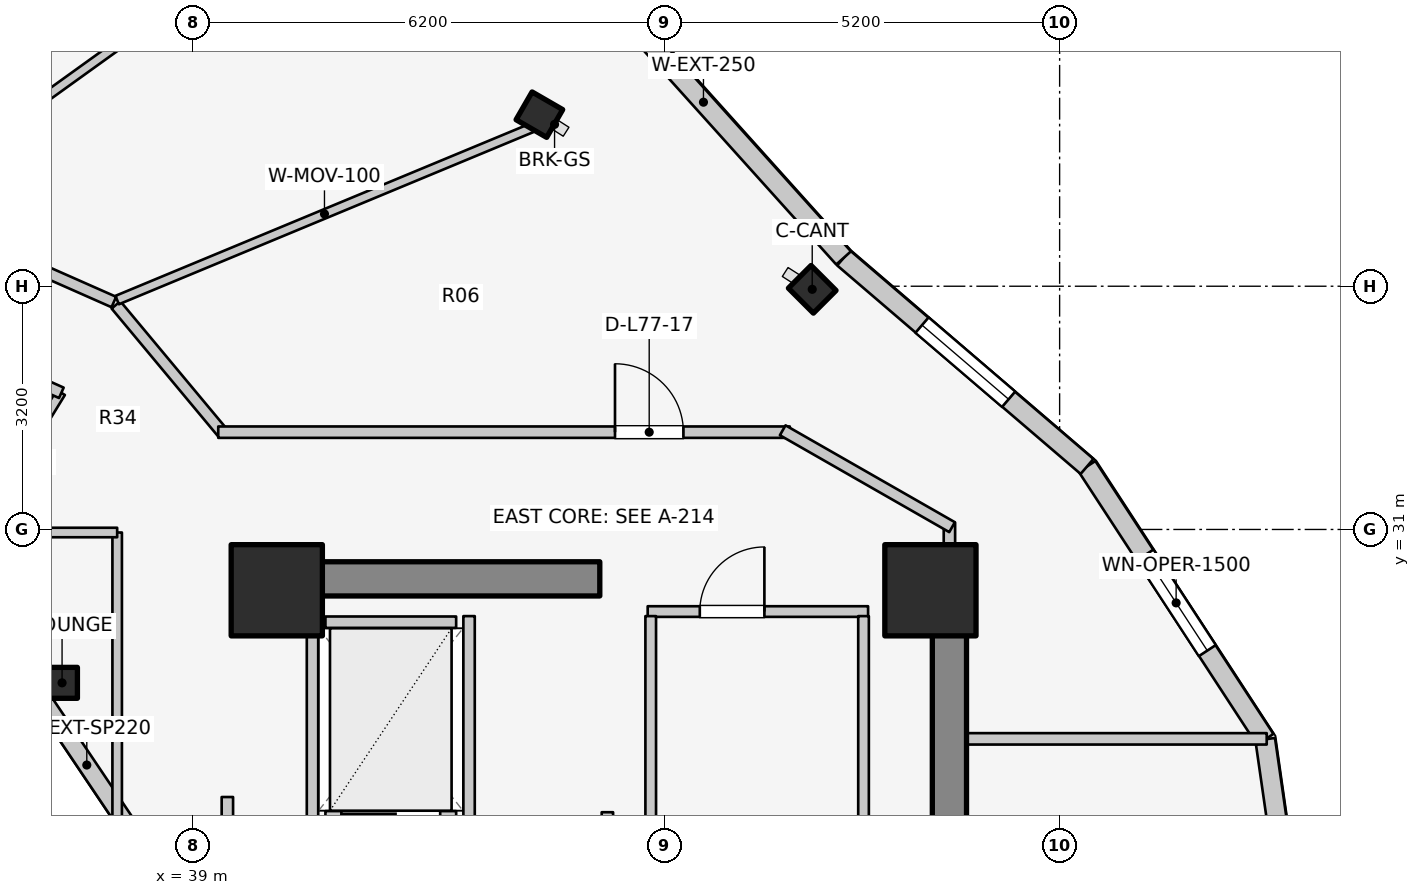
"""IFC4 building model, lengths in metres.
Left out: names, types, materials, properties, quantities, classifications, styles, units other than length and angle.
Written with IfcOpenShell. Run it as: python <this file> out.ifc"""

import sys

from ifc_helpers import new_model, si_unit, direction, frame, frame_2d, origin, origin_2d, place, context, subcontext, project, spatial, rectangle, i_section, extrude, element, fill, save


model = new_model("IFC4")
c1 = context("Model", 3, precision=1e-05, world=origin(), true_north=direction((0.0, 1.0)))
c2 = subcontext(c1, "Body", "Model", "MODEL_VIEW")
j1 = project(units=[si_unit("LENGTHUNIT", "METRE"), si_unit("PLANEANGLEUNIT", "RADIAN")], contexts=[c1])
p1 = place(None, origin())
s1 = spatial("IfcSite", under=j1, at=p1, CompositionType="ELEMENT")
p2 = place(p1, origin())
s2 = spatial("IfcBuilding", under=s1, at=p2, CompositionType="ELEMENT")
p3 = place(p2, frame((0.0, 0.0, 253.2)))
s3 = spatial("IfcBuildingStorey", under=s2, at=p3, CompositionType="ELEMENT", Elevation=253.2)
p4 = place(p3, frame((48.95, 17.05, 0.0), z_axis=(0.0, 0.0, 1.0), x_axis=(0.0, 1.0, 0.0)))
e1 = element("IfcWall", 1, at=p4, inside=s3, PredefinedType="SHEAR", context=c2, shape_type="SweptSolid", body=[
    extrude(rectangle(XDim=12.8, YDim=0.45, at=frame_2d((6.4, 0.0))), origin(), (0.0, 0.0, 1.0), 3.6),
])
p5 = place(p3, frame((39.85, 30.35, 0.0), z_axis=(0.0, 0.0, 1.0), x_axis=(1.0, 0.0, 0.0)))
e2 = element("IfcWall", 2, at=p5, inside=s3, PredefinedType="SHEAR", context=c2, shape_type="SweptSolid", body=[
    extrude(rectangle(XDim=4.5, YDim=0.45, at=frame_2d((2.25, 0.0))), origin(), (0.0, 0.0, 1.0), 3.6),
])
for number, where, z_axis, x_axis in (
    (3, (48.7, 30.2, 0.0), (0.0, 0.0, 1.0), (1.0, 0.0, 0.0)),
    (4, (40.1, 30.2, 0.0), (0.0, 0.0, 1.0), (1.0, 0.0, 0.0)),
):
    element("IfcColumn", number, at=place(p3, frame(where, z_axis=z_axis, x_axis=x_axis)), inside=s3, PredefinedType="COLUMN", context=c2, shape_type="SweptSolid", body=[
        extrude(rectangle(XDim=1.2, YDim=1.2, at=origin_2d()), origin(), (0.0, 0.0, 1.0), 3.6),
    ])
p6 = place(p3, frame((37.275, 28.982, 0.0), z_axis=(0.0, 0.0, 1.0), x_axis=(1.0, 0.0, 0.0)))
e5 = element("IfcColumn", 5, at=p6, inside=s3, PredefinedType="COLUMN", context=c2, shape_type="SweptSolid", body=[
    extrude(i_section(OverallWidth=0.404, OverallDepth=0.407, WebThickness=0.027, FlangeThickness=0.044, FilletRadius=0.025, at=origin_2d()), origin(), (0.0, 0.0, 1.0), 3.6),
])
for number, where, z_axis, x_axis in (
    (6, (47.145, 34.159, 0.0), (0.0, 0.0, 1.0), (0.707, 0.707, 0.0)),
    (7, (43.555, 36.457, 0.0), (0.0, 0.0, 1.0), (0.5, 0.866, 0.0)),
):
    element("IfcColumn", number, at=place(p3, frame(where, z_axis=z_axis, x_axis=x_axis)), inside=s3, PredefinedType="COLUMN", context=c2, shape_type="SweptSolid", body=[
        extrude(i_section(OverallWidth=0.422, OverallDepth=0.465, WebThickness=0.045, FlangeThickness=0.073, FilletRadius=0.025, at=origin_2d()), origin(), (0.0, 0.0, 1.0), 3.6),
    ])
p7 = place(p3, frame((38.166, 27.06, 0.0), z_axis=(0.0, 0.0, 1.0), x_axis=(-0.558197800898, 0.829707909492, 0.0)))
e8 = element("IfcWall", 8, at=p7, inside=s3, PredefinedType="STANDARD", context=c2, shape_type="SweptSolid", body=[
    extrude(rectangle(XDim=2.027, YDim=0.23, at=frame_2d((1.013, 0.0))), origin(), (0.0, 0.0, 1.0), 2.6),
])
p8 = place(p3, frame((53.86, 23.0, 0.0), z_axis=(0.0, 0.0, 1.0), x_axis=(-0.142712754019, 0.989764148593, 0.0)))
e9 = element("IfcWall", 9, at=p8, inside=s3, PredefinedType="STANDARD", context=c2, shape_type="SweptSolid", body=[
    extrude(rectangle(XDim=5.293, YDim=0.26, at=frame_2d((2.646, 0.0))), origin(), (0.0, 0.0, 1.0), 3.29),
])
p9 = place(p8, frame((2.678, 0.0, 0.75)))
e10 = element("IfcOpeningElement", 10, at=p9, cuts=e9, PredefinedType="OPENING", context=c2, shape_type="SweptSolid", body=[
    extrude(rectangle(XDim=1.2, YDim=1.5, at=frame_2d((0.6, 0.75))), frame((0.0, 0.14, 0.0), z_axis=(0.0, -1.0, 0.0), x_axis=(1.0, 0.0, 0.0)), (0.0, 0.0, 1.0), 0.28),
])
p10 = place(p3, frame((53.105, 28.239, 0.0), z_axis=(0.0, 0.0, 1.0), x_axis=(-0.546606419826, 0.837389647539, 0.0)))
e11 = element("IfcWall", 11, at=p10, inside=s3, PredefinedType="STANDARD", context=c2, shape_type="SweptSolid", body=[
    extrude(rectangle(XDim=4.288, YDim=0.26, at=frame_2d((2.144, 0.0))), origin(), (0.0, 0.0, 1.0), 3.29),
])
p11 = place(p10, frame((1.394, 0.0, 0.75)))
e12 = element("IfcOpeningElement", 12, at=p11, cuts=e11, PredefinedType="OPENING", context=c2, shape_type="SweptSolid", body=[
    extrude(rectangle(XDim=1.5, YDim=1.6, at=frame_2d((0.75, 0.8))), frame((0.0, 0.14, 0.0), z_axis=(0.0, -1.0, 0.0), x_axis=(1.0, 0.0, 0.0)), (0.0, 0.0, 1.0), 0.28),
])
p12 = place(p3, frame((50.761, 31.829, 0.0), z_axis=(0.0, 0.0, 1.0), x_axis=(-0.759587504333, 0.650405122413, 0.0)))
e13 = element("IfcWall", 13, at=p12, inside=s3, PredefinedType="STANDARD", context=c2, shape_type="SweptSolid", body=[
    extrude(rectangle(XDim=4.217, YDim=0.26, at=frame_2d((2.109, 0.0))), origin(), (0.0, 0.0, 1.0), 3.29),
])
p13 = place(p12, frame((1.359, 0.0, 0.75)))
e14 = element("IfcOpeningElement", 14, at=p13, cuts=e13, PredefinedType="OPENING", context=c2, shape_type="SweptSolid", body=[
    extrude(rectangle(XDim=1.5, YDim=1.6, at=frame_2d((0.75, 0.8))), frame((0.0, 0.14, 0.0), z_axis=(0.0, -1.0, 0.0), x_axis=(1.0, 0.0, 0.0)), (0.0, 0.0, 1.0), 0.28),
])
p14 = place(p3, frame((47.558, 34.572, 0.0), z_axis=(0.0, 0.0, 1.0), x_axis=(-0.668903560134, 0.743349196031, 0.0)))
e15 = element("IfcWall", 15, at=p14, inside=s3, PredefinedType="STANDARD", context=c2, shape_type="SweptSolid", body=[
    extrude(rectangle(XDim=5.513, YDim=0.26, at=frame_2d((2.756, 0.0))), origin(), (0.0, 0.0, 1.0), 3.29),
])
p15 = place(p3, frame((40.74, 27.22, 0.0), z_axis=(0.0, 0.0, 1.0), x_axis=(1.0, 0.0, 0.0)))
e16 = element("IfcWall", 16, at=p15, inside=s3, PredefinedType="SOLIDWALL", context=c2, shape_type="SweptSolid", body=[
    extrude(rectangle(XDim=1.72, YDim=0.15, at=frame_2d((0.86, 0.0))), origin(), (0.0, 0.0, 1.0), 3.295),
])
p16 = place(p15, frame((0.21, 0.0, 0.0)))
e17 = element("IfcOpeningElement", 17, at=p16, cuts=e16, PredefinedType="OPENING", context=c2, shape_type="SweptSolid", body=[
    extrude(rectangle(XDim=1.3, YDim=2.1, at=frame_2d((0.65, 1.05))), frame((0.0, 0.085, 0.0), z_axis=(0.0, -1.0, 0.0), x_axis=(1.0, 0.0, 0.0)), (0.0, 0.0, 1.0), 0.17),
])
p17 = place(p3, frame((40.74, 29.78, 0.0), z_axis=(0.0, 0.0, 1.0), x_axis=(1.0, 0.0, 0.0)))
e18 = element("IfcWall", 18, at=p17, inside=s3, PredefinedType="SOLIDWALL", context=c2, shape_type="SweptSolid", body=[
    extrude(rectangle(XDim=1.72, YDim=0.15, at=frame_2d((0.86, 0.0))), origin(), (0.0, 0.0, 1.0), 3.295),
])
for number, where, z_axis, x_axis in (
    (19, (40.57, 27.14, 0.0), (0.0, 0.0, 1.0), (0.0, 1.0, 0.0)),
    (20, (42.63, 27.14, 0.0), (0.0, 0.0, 1.0), (0.0, 1.0, 0.0)),
):
    element("IfcWall", number, at=place(p3, frame(where, z_axis=z_axis, x_axis=x_axis)), inside=s3, PredefinedType="SOLIDWALL", context=c2, shape_type="SweptSolid", body=[
        extrude(rectangle(XDim=2.72, YDim=0.15, at=frame_2d((1.36, 0.0))), origin(), (0.0, 0.0, 1.0), 3.295),
    ])
p18 = place(p3, frame((44.45, 24.08, 0.0), z_axis=(0.0, 0.0, 1.0), x_axis=(0.0, 1.0, 0.0)))
e21 = element("IfcWall", 21, at=p18, inside=s3, PredefinedType="PARTITIONING", context=c2, shape_type="SweptSolid", body=[
    extrude(rectangle(XDim=3.2, YDim=0.15, at=frame_2d((1.6, 0.0))), origin(), (0.0, 0.0, 1.0), 3.295),
])
p19 = place(p3, frame((39.45, 24.08, 0.0), z_axis=(0.0, 0.0, 1.0), x_axis=(0.0, 1.0, 0.0)))
e22 = element("IfcWall", 22, at=p19, inside=s3, PredefinedType="PARTITIONING", context=c2, shape_type="SweptSolid", body=[
    extrude(rectangle(XDim=3.4, YDim=0.15, at=frame_2d((1.7, 0.0))), origin(), (0.0, 0.0, 1.0), 3.295),
])
p20 = place(p19, frame((2.02, 0.0, 0.0)))
e23 = element("IfcOpeningElement", 23, at=p20, cuts=e22, PredefinedType="OPENING", context=c2, shape_type="SweptSolid", body=[
    extrude(rectangle(XDim=1.1, YDim=2.1, at=frame_2d((0.55, 1.05))), frame((0.0, 0.085, 0.0), z_axis=(0.0, -1.0, 0.0), x_axis=(1.0, 0.0, 0.0)), (0.0, 0.0, 1.0), 0.17),
])
p21 = place(p3, frame((44.98, 29.92, 0.0), z_axis=(0.0, 0.0, 1.0), x_axis=(1.0, 0.0, 0.0)))
e24 = element("IfcWall", 24, at=p21, inside=s3, PredefinedType="PLUMBINGWALL", context=c2, shape_type="SweptSolid", body=[
    extrude(rectangle(XDim=2.9, YDim=0.14, at=frame_2d((1.45, 0.0))), origin(), (0.0, 0.0, 1.0), 3.295),
])
p22 = place(p21, frame((0.686, 0.0, 0.0)))
e25 = element("IfcOpeningElement", 25, at=p22, cuts=e24, PredefinedType="OPENING", context=c2, shape_type="SweptSolid", body=[
    extrude(rectangle(XDim=0.85, YDim=2.05, at=frame_2d((0.425, 1.025))), frame((0.0, 0.08, 0.0), z_axis=(0.0, -1.0, 0.0), x_axis=(1.0, 0.0, 0.0)), (0.0, 0.0, 1.0), 0.16),
])
for number, where, z_axis, x_axis in (
    (26, (45.02, 25.98, 0.0), (0.0, 0.0, 1.0), (0.0, 1.0, 0.0)),
    (27, (47.82, 25.98, 0.0), (0.0, 0.0, 1.0), (0.0, 1.0, 0.0)),
):
    element("IfcWall", number, at=place(p3, frame(where, z_axis=z_axis, x_axis=x_axis)), inside=s3, PredefinedType="PLUMBINGWALL", context=c2, shape_type="SweptSolid", body=[
        extrude(rectangle(XDim=3.88, YDim=0.14, at=frame_2d((1.94, 0.0))), origin(), (0.0, 0.0, 1.0), 3.295),
    ])
p23 = place(p3, frame((35.55, 30.015, 0.0), z_axis=(0.0, 0.0, 1.0), x_axis=(0.522763432117, 0.852477796802, 0.0)))
e28 = element("IfcWall", 28, at=p23, inside=s3, PredefinedType="PARTITIONING", context=c2, shape_type="SweptSolid", body=[
    extrude(rectangle(XDim=3.269, YDim=0.125, at=frame_2d((1.635, 0.0))), origin(), (0.0, 0.0, 1.0), 2.672),
])
p24 = place(p3, frame((37.265, 32.798, 0.0), z_axis=(0.0, 0.0, 1.0), x_axis=(-0.913254317828, 0.407389924971, 0.0)))
e29 = element("IfcWall", 29, at=p24, inside=s3, PredefinedType="PARTITIONING", context=c2, shape_type="SweptSolid", body=[
    extrude(rectangle(XDim=2.787, YDim=0.15, at=frame_2d((1.393, 0.0))), origin(), (0.0, 0.0, 1.0), 2.823),
])
p25 = place(p3, frame((38.0, 25.8, 0.0), z_axis=(0.0, 0.0, 1.0), x_axis=(0.0, 1.0, 0.0)))
e30 = element("IfcWall", 30, at=p25, inside=s3, PredefinedType="PARTITIONING", context=c2, shape_type="SweptSolid", body=[
    extrude(rectangle(XDim=5.16, YDim=0.125, at=frame_2d((2.58, 0.0))), origin(), (0.0, 0.0, 1.0), 2.672),
])
p26 = place(p3, frame((35.4, 30.96, 0.0), z_axis=(0.0, 0.0, 1.0), x_axis=(1.0, 0.0, 0.0)))
e31 = element("IfcWall", 31, at=p26, inside=s3, PredefinedType="PARTITIONING", context=c2, shape_type="SweptSolid", body=[
    extrude(rectangle(XDim=2.6, YDim=0.125, at=frame_2d((1.3, 0.0))), origin(), (0.0, 0.0, 1.0), 2.816),
])
p27 = place(p3, frame((48.95, 28.245, 0.0), z_axis=(0.0, 0.0, 1.0), x_axis=(1.0, 0.0, 0.0)))
e32 = element("IfcWall", 32, at=p27, inside=s3, PredefinedType="PARTITIONING", context=c2, shape_type="SweptSolid", body=[
    extrude(rectangle(XDim=4.175, YDim=0.15, at=frame_2d((2.087, 0.0))), origin(), (0.0, 0.0, 1.0), 3.295),
])
p28 = place(p3, frame((48.95, 29.8, 0.0), z_axis=(0.0, 0.0, 1.0), x_axis=(0.0, 1.0, 0.0)))
e33 = element("IfcWall", 33, at=p28, inside=s3, PredefinedType="PARTITIONING", context=c2, shape_type="SweptSolid", body=[
    extrude(rectangle(XDim=1.29, YDim=0.15, at=frame_2d((0.645, 0.0))), origin(), (0.0, 0.0, 1.0), 3.295),
])
p29 = place(p3, frame((37.984, 33.955, 0.0), z_axis=(0.0, 0.0, 1.0), x_axis=(0.64030392053, -0.76812166312, 0.0)))
e34 = element("IfcWall", 34, at=p29, inside=s3, PredefinedType="PARTITIONING", context=c2, shape_type="SweptSolid", body=[
    extrude(rectangle(XDim=2.21, YDim=0.15, at=frame_2d((1.105, 0.0))), origin(), (0.0, 0.0, 1.0), 2.816),
])
p30 = place(p3, frame((39.33, 32.28, 0.0), z_axis=(0.0, 0.0, 1.0), x_axis=(1.0, 0.0, 0.0)))
e35 = element("IfcWall", 35, at=p30, inside=s3, PredefinedType="PARTITIONING", context=c2, shape_type="SweptSolid", body=[
    extrude(rectangle(XDim=7.52, YDim=0.15, at=frame_2d((3.76, 0.0))), origin(), (0.0, 0.0, 1.0), 2.816),
])
p31 = place(p30, frame((5.22, 0.0, 0.0)))
e36 = element("IfcOpeningElement", 36, at=p31, cuts=e35, PredefinedType="OPENING", context=c2, shape_type="SweptSolid", body=[
    extrude(rectangle(XDim=0.9, YDim=2.1, at=frame_2d((0.45, 1.05))), frame((0.0, 0.085, 0.0), z_axis=(0.0, -1.0, 0.0), x_axis=(1.0, 0.0, 0.0)), (0.0, 0.0, 1.0), 0.17),
])
p32 = place(p3, frame((46.757, 32.305, 0.0), z_axis=(0.0, 0.0, 1.0), x_axis=(0.867991349648, -0.496579315857, 0.0)))
e37 = element("IfcWall", 37, at=p32, inside=s3, PredefinedType="PARTITIONING", context=c2, shape_type="SweptSolid", body=[
    extrude(rectangle(XDim=2.567, YDim=0.15, at=frame_2d((1.283, 0.0))), origin(), (0.0, 0.0, 1.0), 2.66),
])
p33 = place(p3, frame((38.0, 34.018, 0.0), z_axis=(0.0, 0.0, 1.0), x_axis=(0.92349333748, 0.383614462228, 0.0)))
e38 = element("IfcWall", 38, at=p33, inside=s3, PredefinedType="MOVABLE", context=c2, shape_type="SweptSolid", body=[
    extrude(rectangle(XDim=5.907, YDim=0.12, at=frame_2d((2.954, 0.0))), origin(), (0.0, 0.0, 1.0), 2.66),
])
p34 = place(p3, frame((35.124, 35.297, 0.0), z_axis=(0.0, 0.0, 1.0), x_axis=(0.811745719064, 0.584011033783, 0.0)))
e39 = element("IfcWall", 39, at=p34, inside=s3, PredefinedType="MOVABLE", context=c2, shape_type="SweptSolid", body=[
    extrude(rectangle(XDim=4.534, YDim=0.12, at=frame_2d((2.267, 0.0))), origin(), (0.0, 0.0, 1.0), 2.66),
])
p35 = place(p3, frame((37.956, 33.992, 0.0), z_axis=(0.0, 0.0, 1.0), x_axis=(-0.914642679993, 0.404263240891, 0.0)))
e40 = element("IfcWall", 40, at=p35, inside=s3, PredefinedType="PARTITIONING", context=c2, shape_type="SweptSolid", body=[
    extrude(rectangle(XDim=3.154, YDim=0.15, at=frame_2d((1.577, 0.0))), origin(), (0.0, 0.0, 1.0), 2.823),
])
p36 = place(p35, frame((1.102, 0.0, 0.0)))
e41 = element("IfcOpeningElement", 41, at=p36, cuts=e40, PredefinedType="OPENING", context=c2, shape_type="SweptSolid", body=[
    extrude(rectangle(XDim=0.95, YDim=2.1, at=frame_2d((0.475, 1.05))), frame((0.0, 0.085, 0.0), z_axis=(0.0, -1.0, 0.0), x_axis=(1.0, 0.0, 0.0)), (0.0, 0.0, 1.0), 0.17),
])
p37 = place(p11, origin())
e42 = element("IfcWindow", 42, at=p37, inside=s3, PartitioningType="SINGLE_PANEL", PredefinedType="WINDOW", context=c2, shape_type="SweptSolid", body=[
    extrude(rectangle(XDim=1.5, YDim=1.6, at=frame_2d((0.75, 0.8))), frame((0.0, 0.03, 0.0), z_axis=(0.0, -1.0, 0.0), x_axis=(1.0, 0.0, 0.0)), (0.0, 0.0, 1.0), 0.06),
])
fill(e12, e42)
p38 = place(p13, origin())
e43 = element("IfcWindow", 43, at=p38, inside=s3, PartitioningType="SINGLE_PANEL", PredefinedType="WINDOW", context=c2, shape_type="SweptSolid", body=[
    extrude(rectangle(XDim=1.5, YDim=1.6, at=frame_2d((0.75, 0.8))), frame((0.0, 0.03, 0.0), z_axis=(0.0, -1.0, 0.0), x_axis=(1.0, 0.0, 0.0)), (0.0, 0.0, 1.0), 0.06),
])
fill(e14, e43)
p39 = place(p22, origin())
e44 = element("IfcDoor", 44, at=p39, inside=s3, OperationType="SINGLE_SWING_RIGHT", PredefinedType="DOOR", context=c2, shape_type="SweptSolid", body=[
    extrude(rectangle(XDim=0.85, YDim=2.05, at=frame_2d((0.425, 1.025))), frame((0.0, 0.025, 0.0), z_axis=(0.0, -1.0, 0.0), x_axis=(1.0, 0.0, 0.0)), (0.0, 0.0, 1.0), 0.05),
])
fill(e25, e44)
p40 = place(p31, origin())
e45 = element("IfcDoor", 45, at=p40, inside=s3, OperationType="SINGLE_SWING_LEFT", PredefinedType="DOOR", context=c2, shape_type="SweptSolid", body=[
    extrude(rectangle(XDim=0.9, YDim=2.1, at=frame_2d((0.45, 1.05))), frame((0.0, 0.025, 0.0), z_axis=(0.0, -1.0, 0.0), x_axis=(1.0, 0.0, 0.0)), (0.0, 0.0, 1.0), 0.05),
])
fill(e36, e45)
save(model, sys.argv[1])
